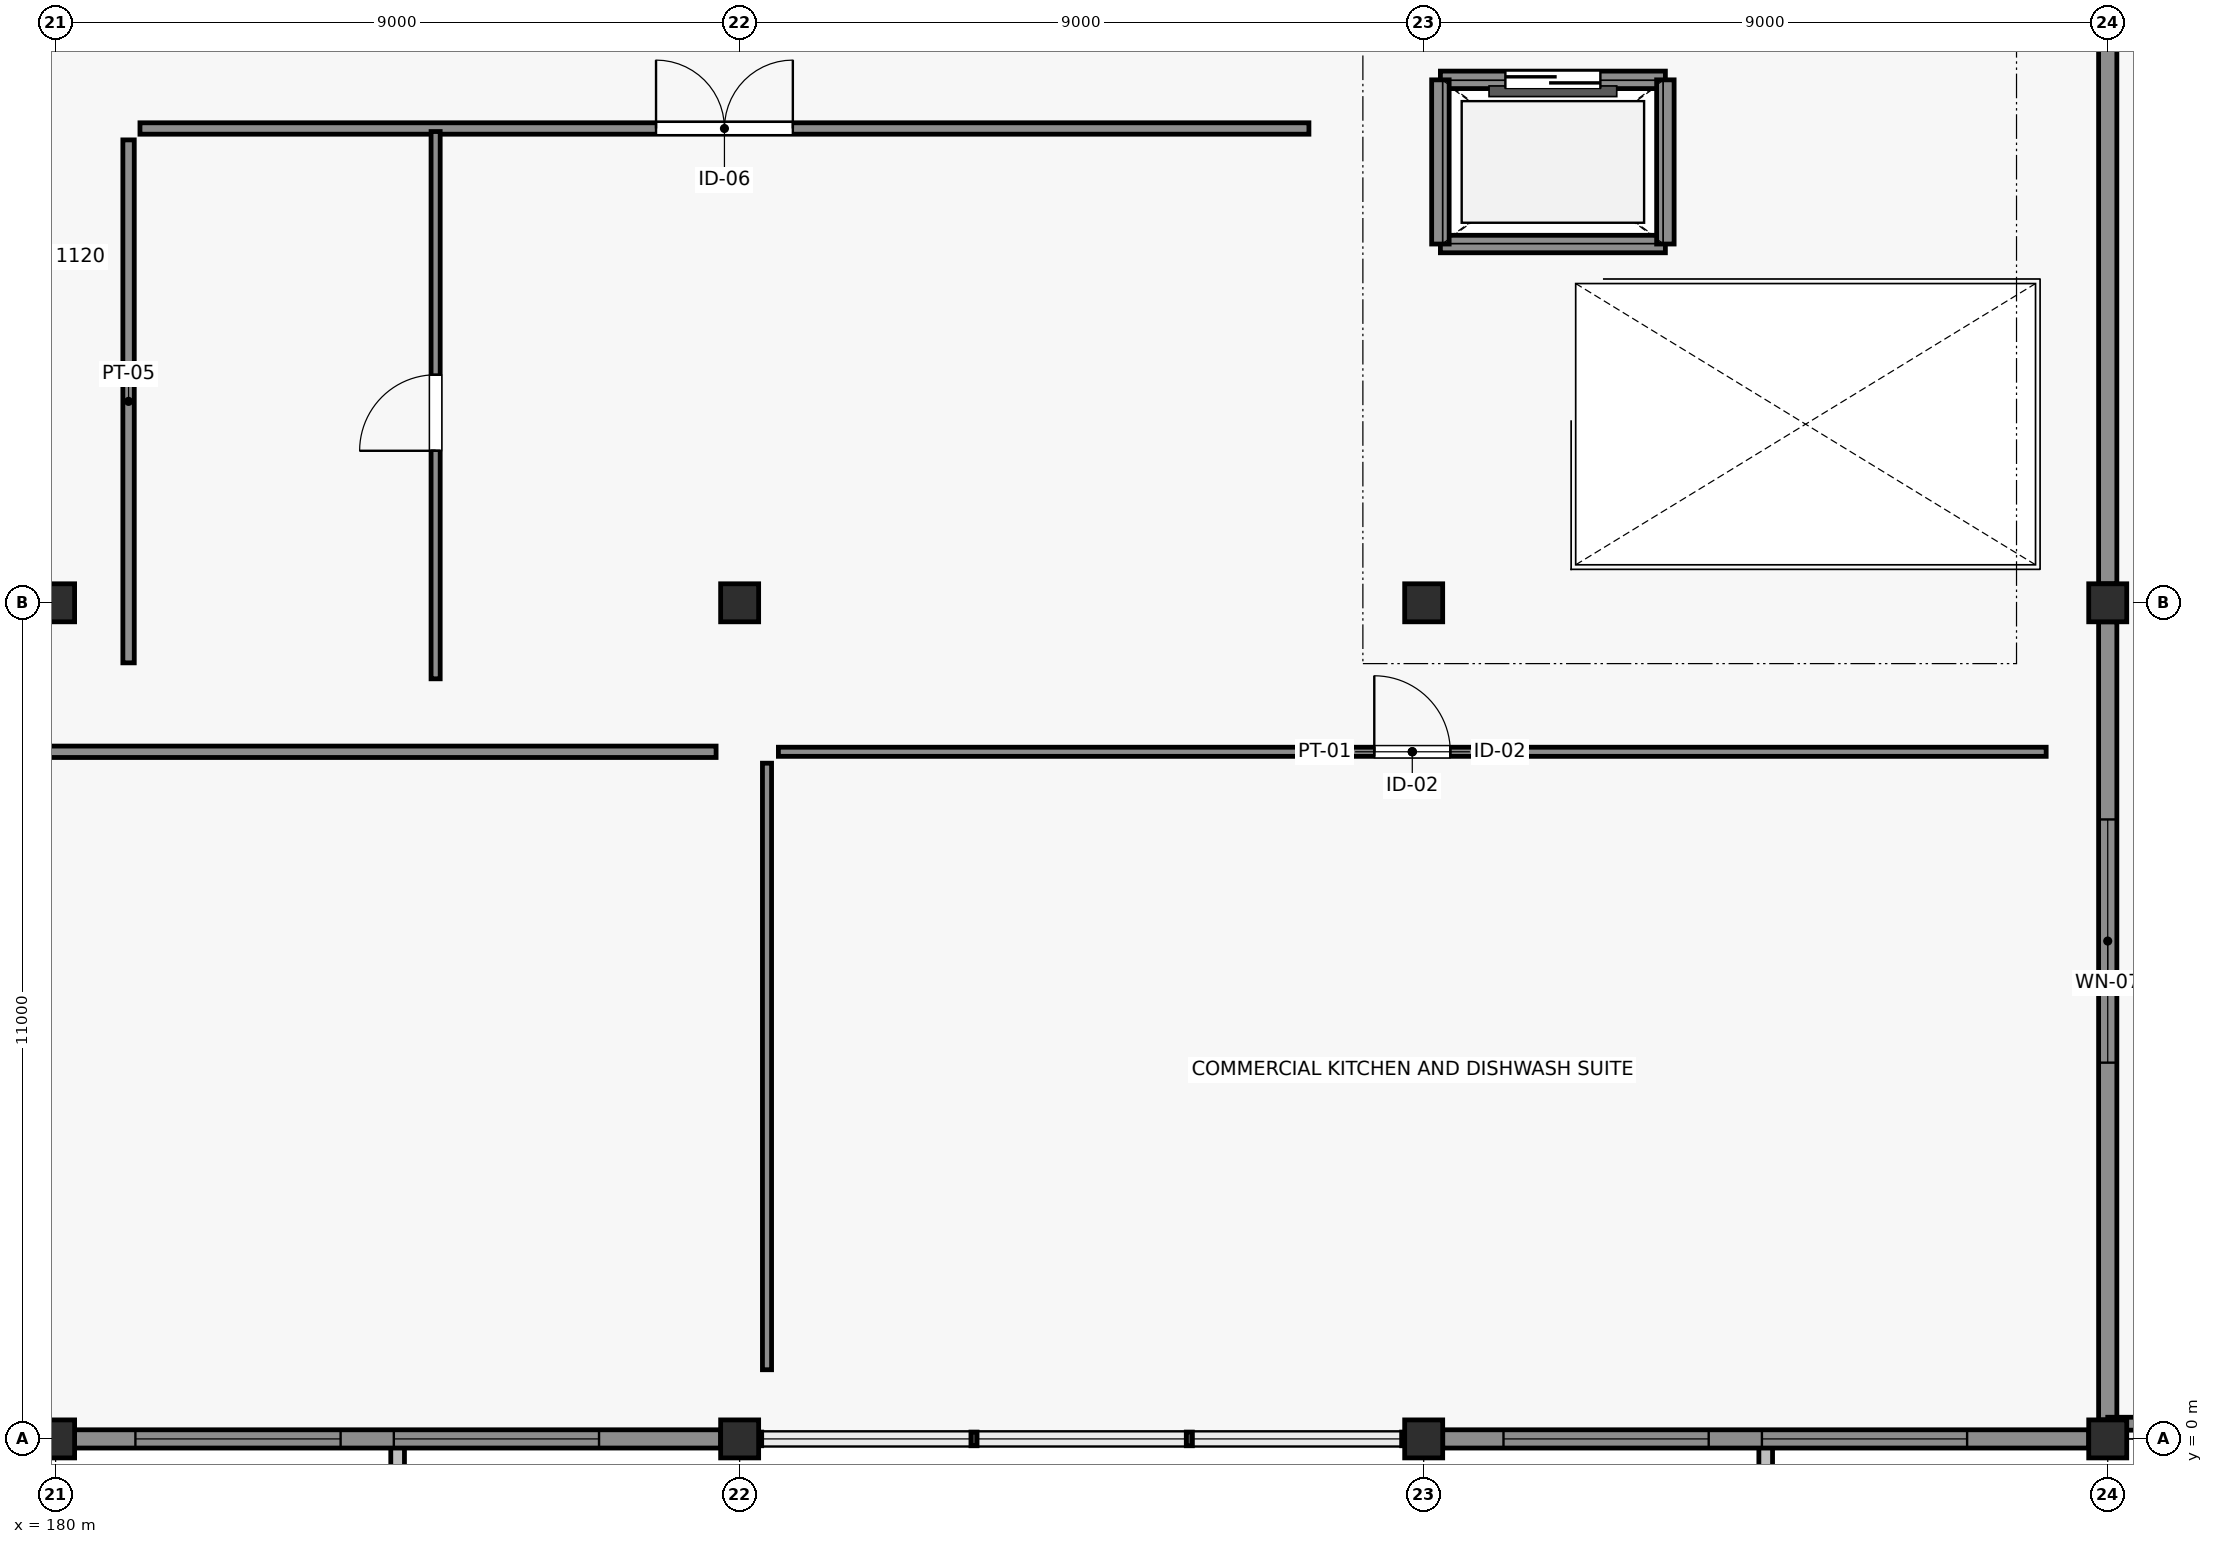
"""IFC4 building model, lengths in metres.
Left out: names, types, materials, properties, quantities, classifications, styles, units other than length and angle.
Written with IfcOpenShell. Run it as: python <this file> out.ifc"""

import sys

from ifc_helpers import new_model, si_unit, direction, frame, frame_2d, origin, origin_2d, place, context, subcontext, project, spatial, rectangle, extrude, element, fill, save


model = new_model("IFC4")
c1 = context("Model", 3, precision=1e-05, world=origin(), true_north=direction((0.0, 1.0)))
c2 = subcontext(c1, "Body", "Model", "MODEL_VIEW")
j1 = project(units=[si_unit("LENGTHUNIT", "METRE"), si_unit("PLANEANGLEUNIT", "RADIAN")], contexts=[c1])
p1 = place(None, origin())
s1 = spatial("IfcSite", under=j1, at=p1, CompositionType="ELEMENT")
p2 = place(p1, origin())
s2 = spatial("IfcBuilding", under=s1, at=p2, CompositionType="ELEMENT")
p3 = place(p2, frame((0.0, 0.0, 9.8)))
s3 = spatial("IfcBuildingStorey", under=s2, at=p3, CompositionType="ELEMENT", Elevation=9.8)
for number, where, z_axis, x_axis in (
    (1, (180.0, 0.0, 0.0), (0.0, 0.0, 1.0), (1.0, 0.0, 0.0)),
    (2, (180.0, 11.0, 0.0), (0.0, 0.0, 1.0), (1.0, 0.0, 0.0)),
    (3, (189.0, 0.0, 0.0), (0.0, 0.0, 1.0), (1.0, 0.0, 0.0)),
    (4, (189.0, 11.0, 0.0), (0.0, 0.0, 1.0), (1.0, 0.0, 0.0)),
    (5, (198.0, 0.0, 0.0), (0.0, 0.0, 1.0), (1.0, 0.0, 0.0)),
    (6, (198.0, 11.0, 0.0), (0.0, 0.0, 1.0), (1.0, 0.0, 0.0)),
    (7, (207.0, 0.0, 0.0), (0.0, 0.0, 1.0), (1.0, 0.0, 0.0)),
    (8, (207.0, 11.0, 0.0), (0.0, 0.0, 1.0), (1.0, 0.0, 0.0)),
):
    element("IfcColumn", number, at=place(p3, frame(where, z_axis=z_axis, x_axis=x_axis)), inside=s3, PredefinedType="COLUMN", context=c2, shape_type="SweptSolid", body=[
        extrude(rectangle(XDim=0.5, YDim=0.5, at=origin_2d()), origin(), (0.0, 0.0, 1.0), 4.87),
    ])
p4 = place(p3, frame((188.75, 0.0, 0.0), z_axis=(0.0, 0.0, 1.0), x_axis=(-1.0, 0.0, 0.0)))
e9 = element("IfcWall", 9, at=p4, inside=s3, PredefinedType="SOLIDWALL", context=c2, shape_type="SweptSolid", body=[
    extrude(rectangle(XDim=8.5, YDim=0.24, at=frame_2d((4.25, 0.0))), origin(), (0.0, 0.0, 1.0), 4.39),
])
p5 = place(p4, frame((1.6, 0.0, 1.0)))
e10 = element("IfcOpeningElement", 10, at=p5, cuts=e9, PredefinedType="OPENING", context=c2, shape_type="SweptSolid", body=[
    extrude(rectangle(XDim=2.7, YDim=1.8, at=frame_2d((1.35, 0.9))), frame((0.0, 0.13, 0.0), z_axis=(0.0, -1.0, 0.0), x_axis=(1.0, 0.0, 0.0)), (0.0, 0.0, 1.0), 0.26),
])
p6 = place(p4, frame((5.0, 0.0, 1.0)))
e11 = element("IfcOpeningElement", 11, at=p6, cuts=e9, PredefinedType="OPENING", context=c2, shape_type="SweptSolid", body=[
    extrude(rectangle(XDim=2.7, YDim=1.8, at=frame_2d((1.35, 0.9))), frame((0.0, 0.13, 0.0), z_axis=(0.0, -1.0, 0.0), x_axis=(1.0, 0.0, 0.0)), (0.0, 0.0, 1.0), 0.26),
])
p7 = place(p3, frame((206.75, 0.0, 0.0), z_axis=(0.0, 0.0, 1.0), x_axis=(-1.0, 0.0, 0.0)))
e12 = element("IfcWall", 12, at=p7, inside=s3, PredefinedType="SOLIDWALL", context=c2, shape_type="SweptSolid", body=[
    extrude(rectangle(XDim=8.5, YDim=0.24, at=frame_2d((4.25, 0.0))), origin(), (0.0, 0.0, 1.0), 4.39),
])
p8 = place(p7, frame((1.6, 0.0, 1.0)))
e13 = element("IfcOpeningElement", 13, at=p8, cuts=e12, PredefinedType="OPENING", context=c2, shape_type="SweptSolid", body=[
    extrude(rectangle(XDim=2.7, YDim=1.8, at=frame_2d((1.35, 0.9))), frame((0.0, 0.13, 0.0), z_axis=(0.0, -1.0, 0.0), x_axis=(1.0, 0.0, 0.0)), (0.0, 0.0, 1.0), 0.26),
])
p9 = place(p7, frame((5.0, 0.0, 1.0)))
e14 = element("IfcOpeningElement", 14, at=p9, cuts=e12, PredefinedType="OPENING", context=c2, shape_type="SweptSolid", body=[
    extrude(rectangle(XDim=2.7, YDim=1.8, at=frame_2d((1.35, 0.9))), frame((0.0, 0.13, 0.0), z_axis=(0.0, -1.0, 0.0), x_axis=(1.0, 0.0, 0.0)), (0.0, 0.0, 1.0), 0.26),
])
p10 = place(p3, frame((207.0, 10.75, 0.0), z_axis=(0.0, 0.0, 1.0), x_axis=(0.0, -1.0, 0.0)))
e15 = element("IfcWall", 15, at=p10, inside=s3, PredefinedType="SOLIDWALL", context=c2, shape_type="SweptSolid", body=[
    extrude(rectangle(XDim=10.5, YDim=0.24, at=frame_2d((5.25, 0.0))), origin(), (0.0, 0.0, 1.0), 4.39),
])
p11 = place(p10, frame((2.6, 0.0, 1.05)))
e16 = element("IfcOpeningElement", 16, at=p11, cuts=e15, PredefinedType="OPENING", context=c2, shape_type="SweptSolid", body=[
    extrude(rectangle(XDim=3.2, YDim=1.8, at=frame_2d((1.6, 0.9))), frame((0.0, 0.13, 0.0), z_axis=(0.0, -1.0, 0.0), x_axis=(1.0, 0.0, 0.0)), (0.0, 0.0, 1.0), 0.26),
])
p12 = place(p3, frame((207.0, 22.25, 0.0), z_axis=(0.0, 0.0, 1.0), x_axis=(0.0, -1.0, 0.0)))
e17 = element("IfcWall", 17, at=p12, inside=s3, PredefinedType="SOLIDWALL", context=c2, shape_type="SweptSolid", body=[
    extrude(rectangle(XDim=11.0, YDim=0.24, at=frame_2d((5.5, 0.0))), origin(), (0.0, 0.0, 1.0), 4.39),
])
p13 = place(p3, frame((207.0, 0.2, 0.0), z_axis=(0.0, 0.0, 1.0), x_axis=(1.0, 0.0, 0.0)))
e18 = element("IfcWall", 18, at=p13, inside=s3, PredefinedType="PARAPET", context=c2, shape_type="SweptSolid", body=[
    extrude(rectangle(XDim=8.8, YDim=0.17, at=frame_2d((4.4, 0.0))), origin(), (0.0, 0.0, 1.0), 1.15),
])
p14 = place(p3, frame((181.11, 17.24, 0.0), z_axis=(0.0, 0.0, 1.0), x_axis=(1.0, 0.0, 0.0)))
e19 = element("IfcWall", 19, at=p14, inside=s3, PredefinedType="PARTITIONING", context=c2, shape_type="SweptSolid", body=[
    extrude(rectangle(XDim=15.38, YDim=0.15, at=frame_2d((7.69, 0.0))), origin(), (0.0, 0.0, 1.0), 4.44),
])
p15 = place(p14, frame((6.79, 0.0, 0.0)))
e20 = element("IfcOpeningElement", 20, at=p15, cuts=e19, PredefinedType="OPENING", context=c2, shape_type="SweptSolid", body=[
    extrude(rectangle(XDim=1.8, YDim=2.3, at=frame_2d((0.9, 1.15))), frame((0.0, 0.085, 0.0), z_axis=(0.0, -1.0, 0.0), x_axis=(1.0, 0.0, 0.0)), (0.0, 0.0, 1.0), 0.17),
])
p16 = place(p3, frame((180.96, 10.21, 0.0), z_axis=(0.0, 0.0, 1.0), x_axis=(0.0, 1.0, 0.0)))
e21 = element("IfcWall", 21, at=p16, inside=s3, PredefinedType="PARTITIONING", context=c2, shape_type="SweptSolid", body=[
    extrude(rectangle(XDim=6.88, YDim=0.15, at=frame_2d((3.44, 0.0))), origin(), (0.0, 0.0, 1.0), 4.44),
])
p17 = place(p3, frame((153.81, 9.04, 0.0), z_axis=(0.0, 0.0, 1.0), x_axis=(1.0, 0.0, 0.0)))
e22 = element("IfcWall", 22, at=p17, inside=s3, PredefinedType="PARTITIONING", context=c2, shape_type="SweptSolid", body=[
    extrude(rectangle(XDim=34.88, YDim=0.15, at=frame_2d((17.44, 0.0))), origin(), (0.0, 0.0, 1.0), 4.44),
])
p18 = place(p17, frame((16.365, 0.0, 0.0)))
e23 = element("IfcOpeningElement", 23, at=p18, cuts=e22, PredefinedType="OPENING", context=c2, shape_type="SweptSolid", body=[
    extrude(rectangle(XDim=2.15, YDim=2.4, at=frame_2d((1.075, 1.2))), frame((0.0, 0.085, 0.0), z_axis=(0.0, -1.0, 0.0), x_axis=(1.0, 0.0, 0.0)), (0.0, 0.0, 1.0), 0.17),
])
p19 = place(p3, frame((189.51, 9.04, 0.0), z_axis=(0.0, 0.0, 1.0), x_axis=(1.0, 0.0, 0.0)))
e24 = element("IfcWall", 24, at=p19, inside=s3, PredefinedType="PARTITIONING", context=c2, shape_type="SweptSolid", body=[
    extrude(rectangle(XDim=16.68, YDim=0.12, at=frame_2d((8.34, 0.0))), origin(), (0.0, 0.0, 1.0), 4.44),
])
p20 = place(p19, frame((7.84, 0.0, 0.0)))
e25 = element("IfcOpeningElement", 25, at=p20, cuts=e24, PredefinedType="OPENING", context=c2, shape_type="SweptSolid", body=[
    extrude(rectangle(XDim=1.0, YDim=2.15, at=frame_2d((0.5, 1.075))), frame((0.0, 0.07, 0.0), z_axis=(0.0, -1.0, 0.0), x_axis=(1.0, 0.0, 0.0)), (0.0, 0.0, 1.0), 0.14),
])
p21 = place(p3, frame((189.36, 0.91, 0.0), z_axis=(0.0, 0.0, 1.0), x_axis=(0.0, 1.0, 0.0)))
e26 = element("IfcWall", 26, at=p21, inside=s3, PredefinedType="PARTITIONING", context=c2, shape_type="SweptSolid", body=[
    extrude(rectangle(XDim=7.98, YDim=0.12, at=frame_2d((3.99, 0.0))), origin(), (0.0, 0.0, 1.0), 4.8),
])
p22 = place(p3, frame((198.22, 17.88, 0.0), z_axis=(0.0, 0.0, 1.0), x_axis=(1.0, 0.0, 0.0)))
e27 = element("IfcWall", 27, at=p22, inside=s3, PredefinedType="SOLIDWALL", context=c2, shape_type="SweptSolid", body=[
    extrude(rectangle(XDim=2.96, YDim=0.23, at=frame_2d((1.48, 0.0))), origin(), (0.0, 0.0, 1.0), 4.44),
])
p23 = place(p22, frame((0.855, 0.0, 0.0)))
e28 = element("IfcOpeningElement", 28, at=p23, cuts=e27, PredefinedType="OPENING", context=c2, shape_type="SweptSolid", body=[
    extrude(rectangle(XDim=1.25, YDim=2.2, at=frame_2d((0.625, 1.1))), frame((0.0, 0.125, 0.0), z_axis=(0.0, -1.0, 0.0), x_axis=(1.0, 0.0, 0.0)), (0.0, 0.0, 1.0), 0.25),
])
p24 = place(p3, frame((201.18, 15.72, 0.0), z_axis=(0.0, 0.0, 1.0), x_axis=(-1.0, 0.0, 0.0)))
e29 = element("IfcWall", 29, at=p24, inside=s3, PredefinedType="SOLIDWALL", context=c2, shape_type="SweptSolid", body=[
    extrude(rectangle(XDim=2.96, YDim=0.23, at=frame_2d((1.48, 0.0))), origin(), (0.0, 0.0, 1.0), 4.44),
])
p25 = place(p3, frame((198.22, 15.72, 0.0), z_axis=(0.0, 0.0, 1.0), x_axis=(0.0, 1.0, 0.0)))
e30 = element("IfcWall", 30, at=p25, inside=s3, PredefinedType="SOLIDWALL", context=c2, shape_type="SweptSolid", body=[
    extrude(rectangle(XDim=2.16, YDim=0.23, at=frame_2d((1.08, 0.0))), origin(), (0.0, 0.0, 1.0), 4.44),
])
p26 = place(p3, frame((201.18, 17.88, 0.0), z_axis=(0.0, 0.0, 1.0), x_axis=(0.0, -1.0, 0.0)))
e31 = element("IfcWall", 31, at=p26, inside=s3, PredefinedType="SOLIDWALL", context=c2, shape_type="SweptSolid", body=[
    extrude(rectangle(XDim=2.16, YDim=0.23, at=frame_2d((1.08, 0.0))), origin(), (0.0, 0.0, 1.0), 4.96),
])
p27 = place(p3, frame((185.0, 10.0, 0.0), z_axis=(0.0, 0.0, 1.0), x_axis=(0.0, 1.0, 0.0)))
e32 = element("IfcWall", 32, at=p27, inside=s3, PredefinedType="PARTITIONING", context=c2, shape_type="SweptSolid", body=[
    extrude(rectangle(XDim=7.2, YDim=0.12, at=frame_2d((3.6, 0.0))), origin(), (0.0, 0.0, 1.0), 4.44),
])
p28 = place(p27, frame((3.0, 0.0, 0.0)))
e33 = element("IfcOpeningElement", 33, at=p28, cuts=e32, PredefinedType="OPENING", context=c2, shape_type="SweptSolid", body=[
    extrude(rectangle(XDim=1.0, YDim=2.15, at=frame_2d((0.5, 1.075))), frame((0.0, 0.07, 0.0), z_axis=(0.0, -1.0, 0.0), x_axis=(1.0, 0.0, 0.0)), (0.0, 0.0, 1.0), 0.14),
])
p29 = place(p5, origin())
e34 = element("IfcWindow", 34, at=p29, inside=s3, PartitioningType="SINGLE_PANEL", PredefinedType="WINDOW", context=c2, shape_type="SweptSolid", body=[
    extrude(rectangle(XDim=2.7, YDim=1.8, at=frame_2d((1.35, 0.9))), frame((0.0, 0.03, 0.0), z_axis=(0.0, -1.0, 0.0), x_axis=(1.0, 0.0, 0.0)), (0.0, 0.0, 1.0), 0.06),
])
fill(e10, e34)
p30 = place(p6, origin())
e35 = element("IfcWindow", 35, at=p30, inside=s3, PartitioningType="SINGLE_PANEL", PredefinedType="WINDOW", context=c2, shape_type="SweptSolid", body=[
    extrude(rectangle(XDim=2.7, YDim=1.8, at=frame_2d((1.35, 0.9))), frame((0.0, 0.03, 0.0), z_axis=(0.0, -1.0, 0.0), x_axis=(1.0, 0.0, 0.0)), (0.0, 0.0, 1.0), 0.06),
])
fill(e11, e35)
p31 = place(p8, origin())
e36 = element("IfcWindow", 36, at=p31, inside=s3, PartitioningType="SINGLE_PANEL", PredefinedType="WINDOW", context=c2, shape_type="SweptSolid", body=[
    extrude(rectangle(XDim=2.7, YDim=1.8, at=frame_2d((1.35, 0.9))), frame((0.0, 0.03, 0.0), z_axis=(0.0, -1.0, 0.0), x_axis=(1.0, 0.0, 0.0)), (0.0, 0.0, 1.0), 0.06),
])
fill(e13, e36)
p32 = place(p9, origin())
e37 = element("IfcWindow", 37, at=p32, inside=s3, PartitioningType="SINGLE_PANEL", PredefinedType="WINDOW", context=c2, shape_type="SweptSolid", body=[
    extrude(rectangle(XDim=2.7, YDim=1.8, at=frame_2d((1.35, 0.9))), frame((0.0, 0.03, 0.0), z_axis=(0.0, -1.0, 0.0), x_axis=(1.0, 0.0, 0.0)), (0.0, 0.0, 1.0), 0.06),
])
fill(e14, e37)
p33 = place(p11, origin())
e38 = element("IfcWindow", 38, at=p33, inside=s3, PartitioningType="SINGLE_PANEL", PredefinedType="WINDOW", context=c2, shape_type="SweptSolid", body=[
    extrude(rectangle(XDim=3.2, YDim=1.8, at=frame_2d((1.6, 0.9))), frame((0.0, 0.03, 0.0), z_axis=(0.0, -1.0, 0.0), x_axis=(1.0, 0.0, 0.0)), (0.0, 0.0, 1.0), 0.06),
])
fill(e16, e38)
p34 = place(p15, origin())
e39 = element("IfcDoor", 39, at=p34, inside=s3, OperationType="DOUBLE_DOOR_SINGLE_SWING", PredefinedType="DOOR", context=c2, shape_type="SweptSolid", body=[
    extrude(rectangle(XDim=1.8, YDim=2.3, at=frame_2d((0.9, 1.15))), frame((0.0, 0.025, 0.0), z_axis=(0.0, -1.0, 0.0), x_axis=(1.0, 0.0, 0.0)), (0.0, 0.0, 1.0), 0.05),
])
fill(e20, e39)
p35 = place(p20, origin())
e40 = element("IfcDoor", 40, at=p35, inside=s3, OperationType="SINGLE_SWING_LEFT", PredefinedType="DOOR", context=c2, shape_type="SweptSolid", body=[
    extrude(rectangle(XDim=1.0, YDim=2.15, at=frame_2d((0.5, 1.075))), frame((0.0, 0.025, 0.0), z_axis=(0.0, -1.0, 0.0), x_axis=(1.0, 0.0, 0.0)), (0.0, 0.0, 1.0), 0.05),
])
fill(e25, e40)
p36 = place(p23, origin())
e41 = element("IfcDoor", 41, at=p36, inside=s3, OperationType="DOUBLE_DOOR_SLIDING", PredefinedType="DOOR", context=c2, shape_type="SweptSolid", body=[
    extrude(rectangle(XDim=1.25, YDim=2.2, at=frame_2d((0.625, 1.1))), frame((0.0, 0.025, 0.0), z_axis=(0.0, -1.0, 0.0), x_axis=(1.0, 0.0, 0.0)), (0.0, 0.0, 1.0), 0.05),
])
fill(e28, e41)
p37 = place(p28, origin())
e42 = element("IfcDoor", 42, at=p37, inside=s3, OperationType="SINGLE_SWING_LEFT", PredefinedType="DOOR", context=c2, shape_type="SweptSolid", body=[
    extrude(rectangle(XDim=1.0, YDim=2.15, at=frame_2d((0.5, 1.075))), frame((0.0, 0.025, 0.0), z_axis=(0.0, -1.0, 0.0), x_axis=(1.0, 0.0, 0.0)), (0.0, 0.0, 1.0), 0.05),
])
fill(e33, e42)
save(model, sys.argv[1])
